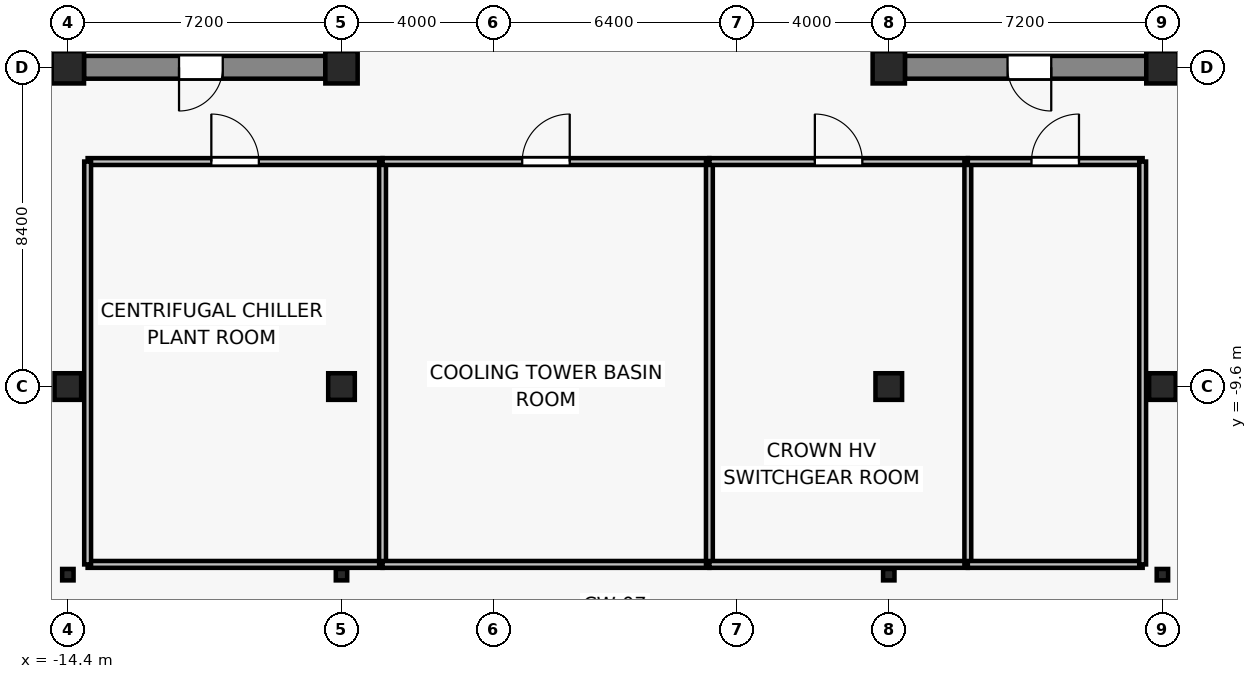
"""IFC4 building model, lengths in metres.
Left out: names, types, materials, properties, quantities, classifications, styles, units other than length and angle.
Written with IfcOpenShell. Run it as: python <this file> out.ifc"""

import sys

from ifc_helpers import new_model, si_unit, direction, frame, frame_2d, origin, origin_2d, place, context, subcontext, project, spatial, rectangle, i_section, extrude, source, transform, mapped, element, fill, save


model = new_model("IFC4")
c1 = context("Model", 3, precision=1e-05, world=origin(), true_north=direction((0.0, 1.0)))
c2 = subcontext(c1, "Body", "Model", "MODEL_VIEW")
j1 = project(units=[si_unit("LENGTHUNIT", "METRE"), si_unit("PLANEANGLEUNIT", "RADIAN")], contexts=[c1])
p1 = place(None, origin())
s1 = spatial("IfcSite", under=j1, at=p1, CompositionType="ELEMENT")
p2 = place(p1, origin())
s2 = spatial("IfcBuilding", under=s1, at=p2, CompositionType="ELEMENT")
p3 = place(p2, frame((0.0, 0.0, 276.2)))
s3 = spatial("IfcBuildingStorey", under=s2, at=p3, CompositionType="ELEMENT", Elevation=276.2)
for number, where, z_axis, x_axis in (
    (1, (-14.4, -1.2, 0.0), (0.0, 0.0, 1.0), (1.0, 0.0, 0.0)),
    (2, (-7.2, -1.2, 0.0), (0.0, 0.0, 1.0), (1.0, 0.0, 0.0)),
    (3, (7.2, -1.2, 0.0), (0.0, 0.0, 1.0), (1.0, 0.0, 0.0)),
    (4, (14.4, -1.2, 0.0), (0.0, 0.0, 1.0), (1.0, 0.0, 0.0)),
):
    element("IfcColumn", number, at=place(p3, frame(where, z_axis=z_axis, x_axis=x_axis)), inside=s3, PredefinedType="COLUMN", context=c2, shape_type="SweptSolid", body=[
        extrude(rectangle(XDim=0.85, YDim=0.85, at=origin_2d()), origin(), (0.0, 0.0, 1.0), 4.6),
    ])
p4 = place(p3, frame((-14.4, -9.6, 0.0), z_axis=(0.0, 0.0, 1.0), x_axis=(1.0, 0.0, 0.0)))
e5 = element("IfcColumn", 5, at=p4, inside=s3, PredefinedType="COLUMN", context=c2, shape_type="SweptSolid", body=[
    extrude(rectangle(XDim=0.7, YDim=0.7, at=origin_2d()), origin(), (0.0, 0.0, 1.0), 4.6),
])
p5 = place(p3, frame((-14.4, -14.55, 0.0), z_axis=(0.0, 0.0, 1.0), x_axis=(1.0, 0.0, 0.0)))
e6 = element("IfcColumn", 6, at=p5, inside=s3, PredefinedType="COLUMN", context=c2, shape_type="SweptSolid", body=[
    extrude(i_section(OverallWidth=0.3, OverallDepth=0.3, WebThickness=0.011, FlangeThickness=0.019, FilletRadius=0.027, at=origin_2d()), origin(), (0.0, 0.0, 1.0), 4.6),
])
p6 = place(p3, frame((-7.2, -9.6, 0.0), z_axis=(0.0, 0.0, 1.0), x_axis=(1.0, 0.0, 0.0)))
e7 = element("IfcColumn", 7, at=p6, inside=s3, PredefinedType="COLUMN", context=c2, shape_type="SweptSolid", body=[
    extrude(rectangle(XDim=0.7, YDim=0.7, at=origin_2d()), origin(), (0.0, 0.0, 1.0), 4.6),
])
p7 = place(p3, frame((-7.2, -14.55, 0.0), z_axis=(0.0, 0.0, 1.0), x_axis=(1.0, 0.0, 0.0)))
e8 = element("IfcColumn", 8, at=p7, inside=s3, PredefinedType="COLUMN", context=c2, shape_type="SweptSolid", body=[
    extrude(i_section(OverallWidth=0.3, OverallDepth=0.3, WebThickness=0.011, FlangeThickness=0.019, FilletRadius=0.027, at=origin_2d()), origin(), (0.0, 0.0, 1.0), 4.6),
])
p8 = place(p3, frame((7.2, -9.6, 0.0), z_axis=(0.0, 0.0, 1.0), x_axis=(1.0, 0.0, 0.0)))
e9 = element("IfcColumn", 9, at=p8, inside=s3, PredefinedType="COLUMN", context=c2, shape_type="SweptSolid", body=[
    extrude(rectangle(XDim=0.7, YDim=0.7, at=origin_2d()), origin(), (0.0, 0.0, 1.0), 4.6),
])
p9 = place(p3, frame((7.2, -14.55, 0.0), z_axis=(0.0, 0.0, 1.0), x_axis=(1.0, 0.0, 0.0)))
e10 = element("IfcColumn", 10, at=p9, inside=s3, PredefinedType="COLUMN", context=c2, shape_type="SweptSolid", body=[
    extrude(i_section(OverallWidth=0.3, OverallDepth=0.3, WebThickness=0.011, FlangeThickness=0.019, FilletRadius=0.027, at=origin_2d()), origin(), (0.0, 0.0, 1.0), 4.6),
])
p10 = place(p3, frame((14.4, -9.6, 0.0), z_axis=(0.0, 0.0, 1.0), x_axis=(1.0, 0.0, 0.0)))
e11 = element("IfcColumn", 11, at=p10, inside=s3, PredefinedType="COLUMN", context=c2, shape_type="SweptSolid", body=[
    extrude(rectangle(XDim=0.7, YDim=0.7, at=origin_2d()), origin(), (0.0, 0.0, 1.0), 4.6),
])
p11 = place(p3, frame((14.4, -14.55, 0.0), z_axis=(0.0, 0.0, 1.0), x_axis=(1.0, 0.0, 0.0)))
e12 = element("IfcColumn", 12, at=p11, inside=s3, PredefinedType="COLUMN", context=c2, shape_type="SweptSolid", body=[
    extrude(i_section(OverallWidth=0.3, OverallDepth=0.3, WebThickness=0.011, FlangeThickness=0.019, FilletRadius=0.027, at=origin_2d()), origin(), (0.0, 0.0, 1.0), 4.6),
])
p12 = place(p3, frame((-7.625, -1.2, 0.0), z_axis=(0.0, 0.0, 1.0), x_axis=(-1.0, 0.0, 0.0)))
e13 = element("IfcWall", 13, at=p12, inside=s3, PredefinedType="SHEAR", context=c2, shape_type="SweptSolid", body=[
    extrude(rectangle(XDim=6.35, YDim=0.6, at=frame_2d((3.175, 0.0))), origin(), (0.0, 0.0, 1.0), 4.38),
])
p13 = place(p12, frame((2.7, 0.0, 0.0)))
e14 = element("IfcOpeningElement", 14, at=p13, cuts=e13, PredefinedType="OPENING", context=c2, shape_type="SweptSolid", body=[
    extrude(rectangle(XDim=1.15, YDim=2.15, at=frame_2d((0.575, 1.075))), frame((0.0, 0.31, 0.0), z_axis=(0.0, -1.0, 0.0), x_axis=(1.0, 0.0, 0.0)), (0.0, 0.0, 1.0), 0.62),
])
p14 = place(p3, frame((13.975, -1.2, 0.0), z_axis=(0.0, 0.0, 1.0), x_axis=(-1.0, 0.0, 0.0)))
e15 = element("IfcWall", 15, at=p14, inside=s3, PredefinedType="SHEAR", context=c2, shape_type="SweptSolid", body=[
    extrude(rectangle(XDim=6.35, YDim=0.6, at=frame_2d((3.175, 0.0))), origin(), (0.0, 0.0, 1.0), 4.38),
])
p15 = place(p14, frame((2.5, 0.0, 0.0)))
e16 = element("IfcOpeningElement", 16, at=p15, cuts=e15, PredefinedType="OPENING", context=c2, shape_type="SweptSolid", body=[
    extrude(rectangle(XDim=1.15, YDim=2.15, at=frame_2d((0.575, 1.075))), frame((0.0, 0.31, 0.0), z_axis=(0.0, -1.0, 0.0), x_axis=(1.0, 0.0, 0.0)), (0.0, 0.0, 1.0), 0.62),
])
for number, where, z_axis, x_axis in (
    (17, (-7.4, -0.9, 0.0), (0.0, 0.0, 1.0), (0.0, 1.0, 0.0)),
    (18, (7.4, -0.9, 0.0), (0.0, 0.0, 1.0), (0.0, 1.0, 0.0)),
):
    element("IfcWall", number, at=place(p3, frame(where, z_axis=z_axis, x_axis=x_axis)), inside=s3, PredefinedType="SHEAR", context=c2, shape_type="SweptSolid", body=[
        extrude(rectangle(XDim=4.15, YDim=0.45, at=frame_2d((2.075, 0.0))), origin(), (0.0, 0.0, 1.0), 4.38),
    ])
p16 = place(p3, frame((-6.12, -14.28, 0.0), z_axis=(0.0, 0.0, 1.0), x_axis=(-1.0, 0.0, 0.0)))
e19 = element("IfcWall", 19, at=p16, inside=s3, PredefinedType="PARTITIONING", context=c2, shape_type="SweptSolid", body=[
    extrude(rectangle(XDim=7.76, YDim=0.18, at=frame_2d((3.88, 0.0))), origin(), (0.0, 0.0, 1.0), 3.77),
])
p17 = place(p3, frame((-13.88, -3.68, 0.0), z_axis=(0.0, 0.0, 1.0), x_axis=(1.0, 0.0, 0.0)))
e20 = element("IfcWall", 20, at=p17, inside=s3, PredefinedType="PARTITIONING", context=c2, shape_type="SweptSolid", body=[
    extrude(rectangle(XDim=7.76, YDim=0.18, at=frame_2d((3.88, 0.0))), origin(), (0.0, 0.0, 1.0), 3.77),
])
p18 = place(p17, frame((3.255, 0.0, 0.0)))
e21 = element("IfcOpeningElement", 21, at=p18, cuts=e20, PredefinedType="OPENING", context=c2, shape_type="SweptSolid", body=[
    extrude(rectangle(XDim=1.25, YDim=2.15, at=frame_2d((0.625, 1.075))), frame((0.0, 0.1, 0.0), z_axis=(0.0, -1.0, 0.0), x_axis=(1.0, 0.0, 0.0)), (0.0, 0.0, 1.0), 0.2),
])
for number, where, z_axis, x_axis in (
    (22, (-13.88, -14.28, 0.0), (0.0, 0.0, 1.0), (0.0, 1.0, 0.0)),
    (23, (-6.12, -3.68, 0.0), (0.0, 0.0, 1.0), (0.0, -1.0, 0.0)),
):
    element("IfcWall", number, at=place(p3, frame(where, z_axis=z_axis, x_axis=x_axis)), inside=s3, PredefinedType="PARTITIONING", context=c2, shape_type="SweptSolid", body=[
        extrude(rectangle(XDim=10.6, YDim=0.18, at=frame_2d((5.3, 0.0))), origin(), (0.0, 0.0, 1.0), 3.77),
    ])
p19 = place(p3, frame((2.48, -14.28, 0.0), z_axis=(0.0, 0.0, 1.0), x_axis=(-1.0, 0.0, 0.0)))
e24 = element("IfcWall", 24, at=p19, inside=s3, PredefinedType="PARTITIONING", context=c2, shape_type="SweptSolid", body=[
    extrude(rectangle(XDim=8.6, YDim=0.18, at=frame_2d((4.3, 0.0))), origin(), (0.0, 0.0, 1.0), 4.09),
])
p20 = place(p3, frame((-6.12, -3.68, 0.0), z_axis=(0.0, 0.0, 1.0), x_axis=(1.0, 0.0, 0.0)))
e25 = element("IfcWall", 25, at=p20, inside=s3, PredefinedType="PARTITIONING", context=c2, shape_type="SweptSolid", body=[
    extrude(rectangle(XDim=8.6, YDim=0.18, at=frame_2d((4.3, 0.0))), origin(), (0.0, 0.0, 1.0), 4.38),
])
p21 = place(p20, frame((3.675, 0.0, 0.0)))
e26 = element("IfcOpeningElement", 26, at=p21, cuts=e25, PredefinedType="OPENING", context=c2, shape_type="SweptSolid", body=[
    extrude(rectangle(XDim=1.25, YDim=2.15, at=frame_2d((0.625, 1.075))), frame((0.0, 0.1, 0.0), z_axis=(0.0, -1.0, 0.0), x_axis=(1.0, 0.0, 0.0)), (0.0, 0.0, 1.0), 0.2),
])
p22 = place(p3, frame((2.48, -3.68, 0.0), z_axis=(0.0, 0.0, 1.0), x_axis=(0.0, -1.0, 0.0)))
e27 = element("IfcWall", 27, at=p22, inside=s3, PredefinedType="PARTITIONING", context=c2, shape_type="SweptSolid", body=[
    extrude(rectangle(XDim=10.6, YDim=0.18, at=frame_2d((5.3, 0.0))), origin(), (0.0, 0.0, 1.0), 3.77),
])
p23 = place(p3, frame((9.28, -14.28, 0.0), z_axis=(0.0, 0.0, 1.0), x_axis=(-1.0, 0.0, 0.0)))
e28 = element("IfcWall", 28, at=p23, inside=s3, PredefinedType="PARTITIONING", context=c2, shape_type="SweptSolid", body=[
    extrude(rectangle(XDim=6.8, YDim=0.18, at=frame_2d((3.4, 0.0))), origin(), (0.0, 0.0, 1.0), 3.77),
])
p24 = place(p3, frame((2.48, -3.68, 0.0), z_axis=(0.0, 0.0, 1.0), x_axis=(1.0, 0.0, 0.0)))
e29 = element("IfcWall", 29, at=p24, inside=s3, PredefinedType="PARTITIONING", context=c2, shape_type="SweptSolid", body=[
    extrude(rectangle(XDim=6.8, YDim=0.18, at=frame_2d((3.4, 0.0))), origin(), (0.0, 0.0, 1.0), 3.77),
])
p25 = place(p24, frame((2.775, 0.0, 0.0)))
e30 = element("IfcOpeningElement", 30, at=p25, cuts=e29, PredefinedType="OPENING", context=c2, shape_type="SweptSolid", body=[
    extrude(rectangle(XDim=1.25, YDim=2.15, at=frame_2d((0.625, 1.075))), frame((0.0, 0.1, 0.0), z_axis=(0.0, -1.0, 0.0), x_axis=(1.0, 0.0, 0.0)), (0.0, 0.0, 1.0), 0.2),
])
p26 = place(p3, frame((9.28, -3.68, 0.0), z_axis=(0.0, 0.0, 1.0), x_axis=(0.0, -1.0, 0.0)))
e31 = element("IfcWall", 31, at=p26, inside=s3, PredefinedType="PARTITIONING", context=c2, shape_type="SweptSolid", body=[
    extrude(rectangle(XDim=10.6, YDim=0.18, at=frame_2d((5.3, 0.0))), origin(), (0.0, 0.0, 1.0), 3.77),
])
p27 = place(p3, frame((13.88, -14.28, 0.0), z_axis=(0.0, 0.0, 1.0), x_axis=(-1.0, 0.0, 0.0)))
e32 = element("IfcWall", 32, at=p27, inside=s3, PredefinedType="PARTITIONING", context=c2, shape_type="SweptSolid", body=[
    extrude(rectangle(XDim=4.6, YDim=0.18, at=frame_2d((2.3, 0.0))), origin(), (0.0, 0.0, 1.0), 4.09),
])
p28 = place(p3, frame((9.28, -3.68, 0.0), z_axis=(0.0, 0.0, 1.0), x_axis=(1.0, 0.0, 0.0)))
e33 = element("IfcWall", 33, at=p28, inside=s3, PredefinedType="PARTITIONING", context=c2, shape_type="SweptSolid", body=[
    extrude(rectangle(XDim=4.6, YDim=0.18, at=frame_2d((2.3, 0.0))), origin(), (0.0, 0.0, 1.0), 4.38),
])
p29 = place(p28, frame((1.675, 0.0, 0.0)))
e34 = element("IfcOpeningElement", 34, at=p29, cuts=e33, PredefinedType="OPENING", context=c2, shape_type="SweptSolid", body=[
    extrude(rectangle(XDim=1.25, YDim=2.15, at=frame_2d((0.625, 1.075))), frame((0.0, 0.1, 0.0), z_axis=(0.0, -1.0, 0.0), x_axis=(1.0, 0.0, 0.0)), (0.0, 0.0, 1.0), 0.2),
])
p30 = place(p3, frame((13.88, -3.68, 0.0), z_axis=(0.0, 0.0, 1.0), x_axis=(0.0, -1.0, 0.0)))
e35 = element("IfcWall", 35, at=p30, inside=s3, PredefinedType="PARTITIONING", context=c2, shape_type="SweptSolid", body=[
    extrude(rectangle(XDim=10.6, YDim=0.18, at=frame_2d((5.3, 0.0))), origin(), (0.0, 0.0, 1.0), 3.77),
])
m1 = source(origin(), c2, "Body", "SweptSolid", [
    extrude(rectangle(XDim=1.15, YDim=2.15, at=frame_2d((0.575, 1.075))), frame((0.0, 0.025, 0.0), z_axis=(0.0, -1.0, 0.0), x_axis=(1.0, 0.0, 0.0)), (0.0, 0.0, 1.0), 0.05),
])
p31 = place(p13, origin())
e36 = element("IfcDoor", 36, at=p31, inside=s3, OperationType="SINGLE_SWING_RIGHT", PredefinedType="DOOR", context=c2, shape_type="MappedRepresentation", body=[
    mapped(m1, transform((0.0, 0.0, 0.0), x_axis=(1.0, 0.0, 0.0), y_axis=(0.0, 1.0, 0.0), z_axis=(0.0, 0.0, 1.0), scale=1.0)),
])
fill(e14, e36)
p32 = place(p15, origin())
e37 = element("IfcDoor", 37, at=p32, inside=s3, OperationType="SINGLE_SWING_LEFT", PredefinedType="DOOR", context=c2, shape_type="MappedRepresentation", body=[
    mapped(m1, transform((0.0, 0.0, 0.0), x_axis=(1.0, 0.0, 0.0), y_axis=(0.0, 1.0, 0.0), z_axis=(0.0, 0.0, 1.0), scale=1.0)),
])
fill(e16, e37)
m2 = source(origin(), c2, "Body", "SweptSolid", [
    extrude(rectangle(XDim=1.25, YDim=2.15, at=frame_2d((0.625, 1.075))), frame((0.0, 0.025, 0.0), z_axis=(0.0, -1.0, 0.0), x_axis=(1.0, 0.0, 0.0)), (0.0, 0.0, 1.0), 0.05),
])
p33 = place(p18, origin())
e38 = element("IfcDoor", 38, at=p33, inside=s3, OperationType="SINGLE_SWING_LEFT", PredefinedType="DOOR", context=c2, shape_type="MappedRepresentation", body=[
    mapped(m2, transform((0.0, 0.0, 0.0), x_axis=(1.0, 0.0, 0.0), y_axis=(0.0, 1.0, 0.0), z_axis=(0.0, 0.0, 1.0), scale=1.0)),
])
fill(e21, e38)
p34 = place(p21, origin())
e39 = element("IfcDoor", 39, at=p34, inside=s3, OperationType="SINGLE_SWING_RIGHT", PredefinedType="DOOR", context=c2, shape_type="MappedRepresentation", body=[
    mapped(m2, transform((0.0, 0.0, 0.0), x_axis=(1.0, 0.0, 0.0), y_axis=(0.0, 1.0, 0.0), z_axis=(0.0, 0.0, 1.0), scale=1.0)),
])
fill(e26, e39)
p35 = place(p25, origin())
e40 = element("IfcDoor", 40, at=p35, inside=s3, OperationType="SINGLE_SWING_LEFT", PredefinedType="DOOR", context=c2, shape_type="MappedRepresentation", body=[
    mapped(m2, transform((0.0, 0.0, 0.0), x_axis=(1.0, 0.0, 0.0), y_axis=(0.0, 1.0, 0.0), z_axis=(0.0, 0.0, 1.0), scale=1.0)),
])
fill(e30, e40)
p36 = place(p29, origin())
e41 = element("IfcDoor", 41, at=p36, inside=s3, OperationType="SINGLE_SWING_RIGHT", PredefinedType="DOOR", context=c2, shape_type="MappedRepresentation", body=[
    mapped(m2, transform((0.0, 0.0, 0.0), x_axis=(1.0, 0.0, 0.0), y_axis=(0.0, 1.0, 0.0), z_axis=(0.0, 0.0, 1.0), scale=1.0)),
])
fill(e34, e41)
save(model, sys.argv[1])
